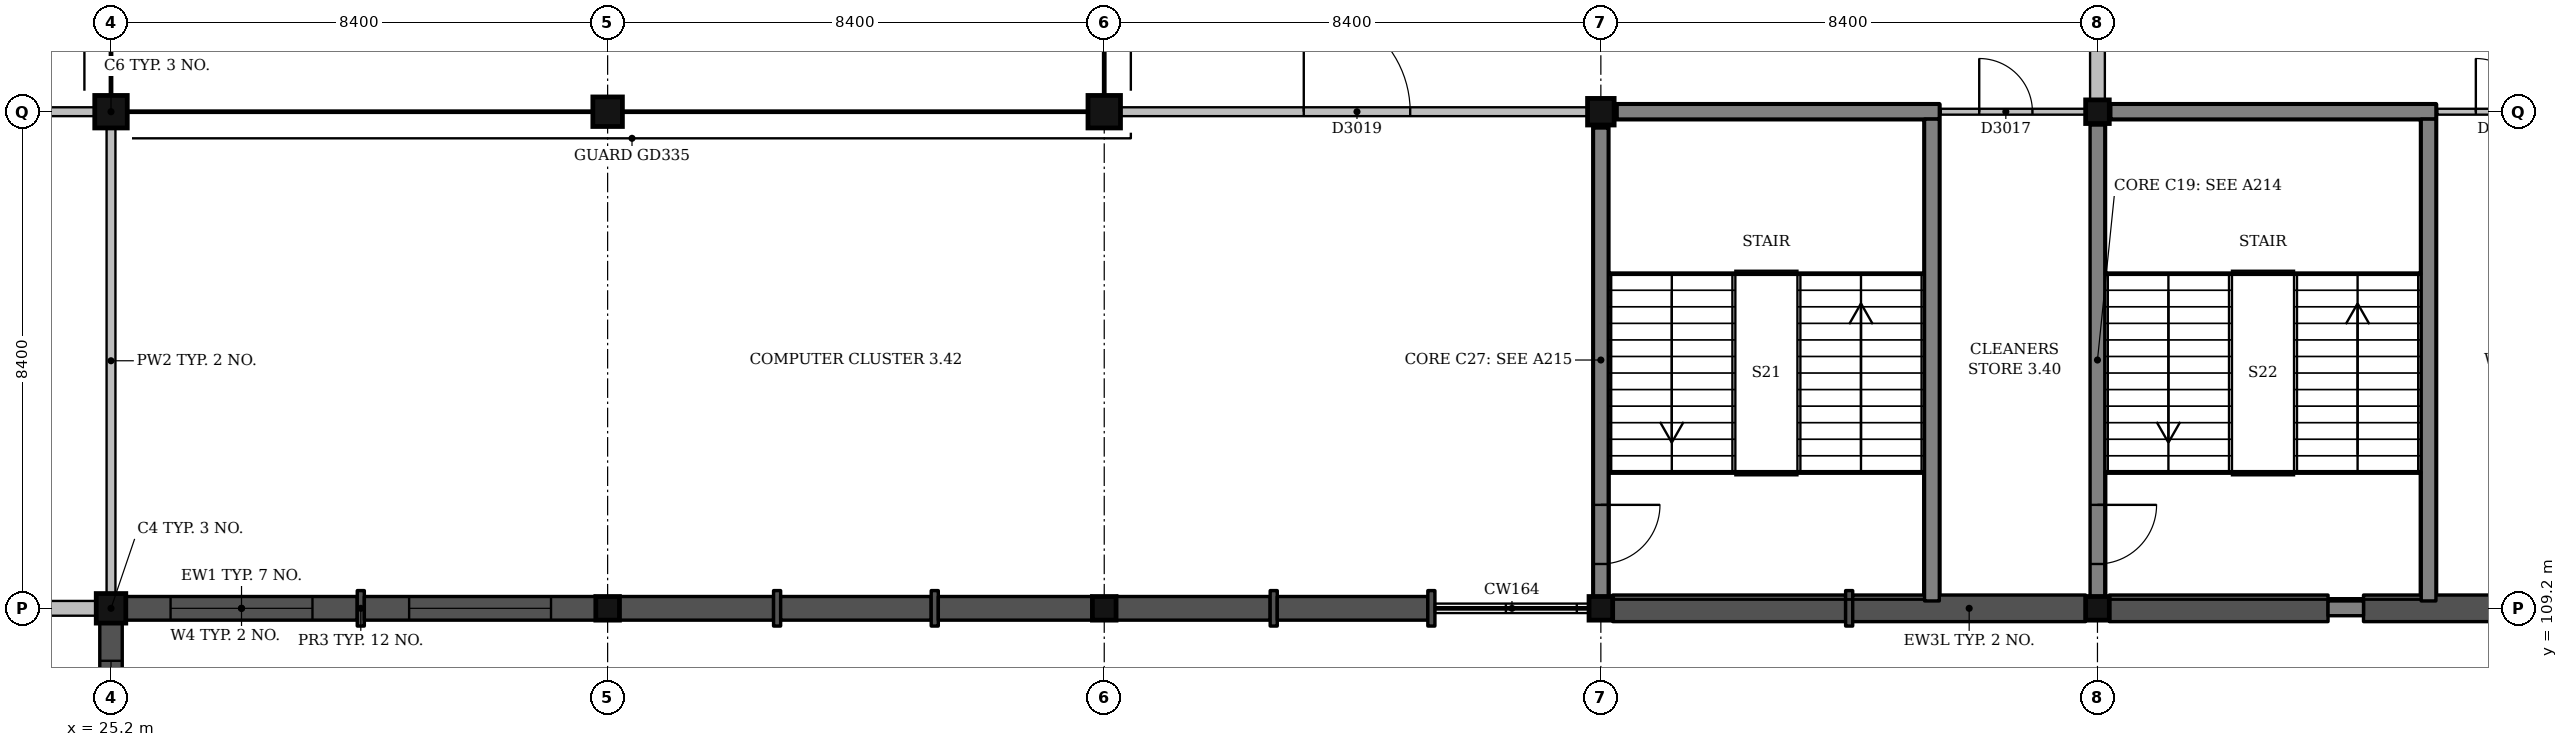
"""IFC4 building model, lengths in metres.
Left out: names, types, materials, properties, quantities, classifications, styles, units other than length and angle.
Written with IfcOpenShell. Run it as: python <this file> out.ifc"""

import sys

from ifc_helpers import new_model, si_unit, direction, frame, frame_2d, origin, origin_2d, place, context, subcontext, project, spatial, rectangle, extrude, element, fill, save


model = new_model("IFC4")
c1 = context("Model", 3, precision=1e-05, world=origin(), true_north=direction((0.0, 1.0)))
c2 = subcontext(c1, "Body", "Model", "MODEL_VIEW")
j1 = project(units=[si_unit("LENGTHUNIT", "METRE"), si_unit("PLANEANGLEUNIT", "RADIAN")], contexts=[c1])
p1 = place(None, origin())
s1 = spatial("IfcSite", under=j1, at=p1, CompositionType="ELEMENT")
p2 = place(p1, origin())
s2 = spatial("IfcBuilding", under=s1, at=p2, CompositionType="ELEMENT")
p3 = place(p2, frame((0.0, 0.0, 13.5)))
s3 = spatial("IfcBuildingStorey", under=s2, at=p3, CompositionType="ELEMENT", Elevation=13.5)
p4 = place(p3, frame((25.2, 109.2, 0.0), z_axis=(0.0, 0.0, 1.0), x_axis=(1.0, 0.0, 0.0)))
e1 = element("IfcColumn", 1, at=p4, inside=s3, PredefinedType="COLUMN", context=c2, shape_type="SweptSolid", body=[
    extrude(rectangle(XDim=0.5, YDim=0.5, at=origin_2d()), origin(), (0.0, 0.0, 1.0), 4.5),
])
p5 = place(p3, frame((25.2, 117.6, 0.0), z_axis=(0.0, 0.0, 1.0), x_axis=(1.0, 0.0, 0.0)))
e2 = element("IfcColumn", 2, at=p5, inside=s3, PredefinedType="COLUMN", context=c2, shape_type="SweptSolid", body=[
    extrude(rectangle(XDim=0.55, YDim=0.55, at=origin_2d()), origin(), (0.0, 0.0, 1.0), 4.5),
])
p6 = place(p3, frame((33.6, 109.2, 0.0), z_axis=(0.0, 0.0, 1.0), x_axis=(1.0, 0.0, 0.0)))
e3 = element("IfcColumn", 3, at=p6, inside=s3, PredefinedType="COLUMN", context=c2, shape_type="SweptSolid", body=[
    extrude(rectangle(XDim=0.4, YDim=0.4, at=origin_2d()), origin(), (0.0, 0.0, 1.0), 4.5),
])
p7 = place(p3, frame((33.6, 117.6, 0.0), z_axis=(0.0, 0.0, 1.0), x_axis=(1.0, 0.0, 0.0)))
e4 = element("IfcColumn", 4, at=p7, inside=s3, PredefinedType="COLUMN", context=c2, shape_type="SweptSolid", body=[
    extrude(rectangle(XDim=0.5, YDim=0.5, at=origin_2d()), origin(), (0.0, 0.0, 1.0), 4.5),
])
p8 = place(p3, frame((42.0, 109.2, 0.0), z_axis=(0.0, 0.0, 1.0), x_axis=(1.0, 0.0, 0.0)))
e5 = element("IfcColumn", 5, at=p8, inside=s3, PredefinedType="COLUMN", context=c2, shape_type="SweptSolid", body=[
    extrude(rectangle(XDim=0.4, YDim=0.4, at=origin_2d()), origin(), (0.0, 0.0, 1.0), 4.5),
])
p9 = place(p3, frame((42.0, 117.6, 0.0), z_axis=(0.0, 0.0, 1.0), x_axis=(1.0, 0.0, 0.0)))
e6 = element("IfcColumn", 6, at=p9, inside=s3, PredefinedType="COLUMN", context=c2, shape_type="SweptSolid", body=[
    extrude(rectangle(XDim=0.55, YDim=0.55, at=origin_2d()), origin(), (0.0, 0.0, 1.0), 4.5),
])
p10 = place(p3, frame((50.4, 109.2, 0.0), z_axis=(0.0, 0.0, 1.0), x_axis=(1.0, 0.0, 0.0)))
e7 = element("IfcColumn", 7, at=p10, inside=s3, PredefinedType="COLUMN", context=c2, shape_type="SweptSolid", body=[
    extrude(rectangle(XDim=0.4, YDim=0.4, at=origin_2d()), origin(), (0.0, 0.0, 1.0), 4.5),
])
p11 = place(p3, frame((50.4, 117.6, 0.0), z_axis=(0.0, 0.0, 1.0), x_axis=(1.0, 0.0, 0.0)))
e8 = element("IfcColumn", 8, at=p11, inside=s3, PredefinedType="COLUMN", context=c2, shape_type="SweptSolid", body=[
    extrude(rectangle(XDim=0.45, YDim=0.45, at=origin_2d()), origin(), (0.0, 0.0, 1.0), 4.5),
])
for number, where, z_axis, x_axis in (
    (9, (58.8, 109.2, 0.0), (0.0, 0.0, 1.0), (1.0, 0.0, 0.0)),
    (10, (58.8, 117.6, 0.0), (0.0, 0.0, 1.0), (1.0, 0.0, 0.0)),
):
    element("IfcColumn", number, at=place(p3, frame(where, z_axis=z_axis, x_axis=x_axis)), inside=s3, PredefinedType="COLUMN", context=c2, shape_type="SweptSolid", body=[
        extrude(rectangle(XDim=0.4, YDim=0.4, at=origin_2d()), origin(), (0.0, 0.0, 1.0), 4.5),
    ])
p12 = place(p3, frame((59.025, 117.6, 0.0), z_axis=(0.0, 0.0, 1.0), x_axis=(1.0, 0.0, 0.0)))
e11 = element("IfcWall", 11, at=p12, inside=s3, PredefinedType="SHEAR", context=c2, shape_type="SweptSolid", body=[
    extrude(rectangle(XDim=5.5, YDim=0.25, at=frame_2d((2.75, 0.0))), origin(), (0.0, 0.0, 1.0), 4.5),
])
p13 = place(p3, frame((58.8, 109.4, 0.0), z_axis=(0.0, 0.0, 1.0), x_axis=(0.0, 1.0, 0.0)))
e12 = element("IfcWall", 12, at=p13, inside=s3, PredefinedType="SHEAR", context=c2, shape_type="SweptSolid", body=[
    extrude(rectangle(XDim=7.975, YDim=0.25, at=frame_2d((3.988, 0.0))), origin(), (0.0, 0.0, 1.0), 4.5),
])
p14 = place(p13, frame((0.55, 0.0, 0.0)))
e13 = element("IfcOpeningElement", 13, at=p14, cuts=e12, PredefinedType="OPENING", context=c2, shape_type="SweptSolid", body=[
    extrude(rectangle(XDim=1.0, YDim=2.1, at=frame_2d((0.5, 1.05))), frame((0.0, 0.135, 0.0), z_axis=(0.0, -1.0, 0.0), x_axis=(1.0, 0.0, 0.0)), (0.0, 0.0, 1.0), 0.27),
])
p15 = place(p3, frame((64.4, 109.325, 0.0), z_axis=(0.0, 0.0, 1.0), x_axis=(0.0, 1.0, 0.0)))
e14 = element("IfcWall", 14, at=p15, inside=s3, PredefinedType="SHEAR", context=c2, shape_type="SweptSolid", body=[
    extrude(rectangle(XDim=8.15, YDim=0.25, at=frame_2d((4.075, 0.0))), origin(), (0.0, 0.0, 1.0), 4.5),
])
p16 = place(p3, frame((50.675, 117.6, 0.0), z_axis=(0.0, 0.0, 1.0), x_axis=(1.0, 0.0, 0.0)))
e15 = element("IfcWall", 15, at=p16, inside=s3, PredefinedType="SHEAR", context=c2, shape_type="SweptSolid", body=[
    extrude(rectangle(XDim=5.45, YDim=0.25, at=frame_2d((2.725, 0.0))), origin(), (0.0, 0.0, 1.0), 4.5),
])
p17 = place(p3, frame((50.4, 109.4, 0.0), z_axis=(0.0, 0.0, 1.0), x_axis=(0.0, 1.0, 0.0)))
e16 = element("IfcWall", 16, at=p17, inside=s3, PredefinedType="SHEAR", context=c2, shape_type="SweptSolid", body=[
    extrude(rectangle(XDim=7.925, YDim=0.25, at=frame_2d((3.962, 0.0))), origin(), (0.0, 0.0, 1.0), 4.5),
])
p18 = place(p17, frame((0.55, 0.0, 0.0)))
e17 = element("IfcOpeningElement", 17, at=p18, cuts=e16, PredefinedType="OPENING", context=c2, shape_type="SweptSolid", body=[
    extrude(rectangle(XDim=1.0, YDim=2.1, at=frame_2d((0.5, 1.05))), frame((0.0, 0.135, 0.0), z_axis=(0.0, -1.0, 0.0), x_axis=(1.0, 0.0, 0.0)), (0.0, 0.0, 1.0), 0.27),
])
p19 = place(p3, frame((56.0, 109.325, 0.0), z_axis=(0.0, 0.0, 1.0), x_axis=(0.0, 1.0, 0.0)))
e18 = element("IfcWall", 18, at=p19, inside=s3, PredefinedType="SHEAR", context=c2, shape_type="SweptSolid", body=[
    extrude(rectangle(XDim=8.15, YDim=0.25, at=frame_2d((4.075, 0.0))), origin(), (0.0, 0.0, 1.0), 4.5),
])
p20 = place(p3, frame((25.2, 105.275, 0.0), z_axis=(0.0, 0.0, 1.0), x_axis=(0.0, 1.0, 0.0)))
e19 = element("IfcWall", 19, at=p20, inside=s3, PredefinedType="SOLIDWALL", context=c2, shape_type="SweptSolid", body=[
    extrude(rectangle(XDim=3.675, YDim=0.38, at=frame_2d((1.837, 0.0))), origin(), (0.0, 0.0, 1.0), 3.35),
])
p21 = place(p20, frame((0.637, 0.0, 1.2)))
e20 = element("IfcOpeningElement", 20, at=p21, cuts=e19, PredefinedType="OPENING", context=c2, shape_type="SweptSolid", body=[
    extrude(rectangle(XDim=2.4, YDim=1.5, at=frame_2d((1.2, 0.75))), frame((0.0, 0.2, 0.0), z_axis=(0.0, -1.0, 0.0), x_axis=(1.0, 0.0, 0.0)), (0.0, 0.0, 1.0), 0.4),
])
p22 = place(p3, frame((25.45, 109.2, 0.0), z_axis=(0.0, 0.0, 1.0), x_axis=(1.0, 0.0, 0.0)))
e21 = element("IfcWall", 21, at=p22, inside=s3, PredefinedType="SOLIDWALL", context=c2, shape_type="SweptSolid", body=[
    extrude(rectangle(XDim=3.915, YDim=0.4, at=frame_2d((1.958, 0.0))), origin(), (0.0, 0.0, 1.0), 4.2),
])
p23 = place(p22, frame((0.758, 0.0, 0.6)))
e22 = element("IfcOpeningElement", 22, at=p23, cuts=e21, PredefinedType="OPENING", context=c2, shape_type="SweptSolid", body=[
    extrude(rectangle(XDim=2.4, YDim=2.4, at=frame_2d((1.2, 1.2))), frame((0.0, 0.21, 0.0), z_axis=(0.0, -1.0, 0.0), x_axis=(1.0, 0.0, 0.0)), (0.0, 0.0, 1.0), 0.42),
])
p24 = place(p3, frame((29.365, 109.2, 0.0), z_axis=(0.0, 0.0, 1.0), x_axis=(1.0, 0.0, 0.0)))
e23 = element("IfcWall", 23, at=p24, inside=s3, PredefinedType="SOLIDWALL", context=c2, shape_type="SweptSolid", body=[
    extrude(rectangle(XDim=0.12, YDim=0.6, at=frame_2d((0.06, 0.0))), origin(), (0.0, 0.0, 1.0), 4.2),
])
p25 = place(p3, frame((29.485, 109.2, 0.0), z_axis=(0.0, 0.0, 1.0), x_axis=(1.0, 0.0, 0.0)))
e24 = element("IfcWall", 24, at=p25, inside=s3, PredefinedType="SOLIDWALL", context=c2, shape_type="SweptSolid", body=[
    extrude(rectangle(XDim=3.915, YDim=0.4, at=frame_2d((1.958, 0.0))), origin(), (0.0, 0.0, 1.0), 4.2),
])
p26 = place(p25, frame((0.758, 0.0, 0.6)))
e25 = element("IfcOpeningElement", 25, at=p26, cuts=e24, PredefinedType="OPENING", context=c2, shape_type="SweptSolid", body=[
    extrude(rectangle(XDim=2.4, YDim=2.4, at=frame_2d((1.2, 1.2))), frame((0.0, 0.21, 0.0), z_axis=(0.0, -1.0, 0.0), x_axis=(1.0, 0.0, 0.0)), (0.0, 0.0, 1.0), 0.42),
])
p27 = place(p3, frame((33.8, 109.2, 0.0), z_axis=(0.0, 0.0, 1.0), x_axis=(1.0, 0.0, 0.0)))
e26 = element("IfcWall", 26, at=p27, inside=s3, PredefinedType="SOLIDWALL", context=c2, shape_type="SweptSolid", body=[
    extrude(rectangle(XDim=2.607, YDim=0.4, at=frame_2d((1.303, 0.0))), origin(), (0.0, 0.0, 1.0), 3.35),
])
p28 = place(p3, frame((36.407, 109.2, 0.0), z_axis=(0.0, 0.0, 1.0), x_axis=(1.0, 0.0, 0.0)))
e27 = element("IfcWall", 27, at=p28, inside=s3, PredefinedType="SOLIDWALL", context=c2, shape_type="SweptSolid", body=[
    extrude(rectangle(XDim=0.12, YDim=0.6, at=frame_2d((0.06, 0.0))), origin(), (0.0, 0.0, 1.0), 3.35),
])
p29 = place(p3, frame((36.527, 109.2, 0.0), z_axis=(0.0, 0.0, 1.0), x_axis=(1.0, 0.0, 0.0)))
e28 = element("IfcWall", 28, at=p29, inside=s3, PredefinedType="SOLIDWALL", context=c2, shape_type="SweptSolid", body=[
    extrude(rectangle(XDim=2.547, YDim=0.4, at=frame_2d((1.273, 0.0))), origin(), (0.0, 0.0, 1.0), 3.35),
])
p30 = place(p3, frame((39.073, 109.2, 0.0), z_axis=(0.0, 0.0, 1.0), x_axis=(1.0, 0.0, 0.0)))
e29 = element("IfcWall", 29, at=p30, inside=s3, PredefinedType="SOLIDWALL", context=c2, shape_type="SweptSolid", body=[
    extrude(rectangle(XDim=0.12, YDim=0.6, at=frame_2d((0.06, 0.0))), origin(), (0.0, 0.0, 1.0), 3.35),
])
for number, where, z_axis, x_axis in (
    (30, (39.193, 109.2, 0.0), (0.0, 0.0, 1.0), (1.0, 0.0, 0.0)),
    (31, (42.2, 109.2, 0.0), (0.0, 0.0, 1.0), (1.0, 0.0, 0.0)),
):
    element("IfcWall", number, at=place(p3, frame(where, z_axis=z_axis, x_axis=x_axis)), inside=s3, PredefinedType="SOLIDWALL", context=c2, shape_type="SweptSolid", body=[
        extrude(rectangle(XDim=2.607, YDim=0.4, at=frame_2d((1.303, 0.0))), origin(), (0.0, 0.0, 1.0), 3.35),
    ])
p31 = place(p3, frame((44.807, 109.2, 0.0), z_axis=(0.0, 0.0, 1.0), x_axis=(1.0, 0.0, 0.0)))
e32 = element("IfcWall", 32, at=p31, inside=s3, PredefinedType="SOLIDWALL", context=c2, shape_type="SweptSolid", body=[
    extrude(rectangle(XDim=0.12, YDim=0.6, at=frame_2d((0.06, 0.0))), origin(), (0.0, 0.0, 1.0), 3.35),
])
p32 = place(p3, frame((44.927, 109.2, 0.0), z_axis=(0.0, 0.0, 1.0), x_axis=(1.0, 0.0, 0.0)))
e33 = element("IfcWall", 33, at=p32, inside=s3, PredefinedType="SOLIDWALL", context=c2, shape_type="SweptSolid", body=[
    extrude(rectangle(XDim=2.547, YDim=0.4, at=frame_2d((1.273, 0.0))), origin(), (0.0, 0.0, 1.0), 3.35),
])
p33 = place(p3, frame((47.473, 109.2, 0.0), z_axis=(0.0, 0.0, 1.0), x_axis=(1.0, 0.0, 0.0)))
e34 = element("IfcWall", 34, at=p33, inside=s3, PredefinedType="SOLIDWALL", context=c2, shape_type="SweptSolid", body=[
    extrude(rectangle(XDim=0.12, YDim=0.6, at=frame_2d((0.06, 0.0))), origin(), (0.0, 0.0, 1.0), 3.35),
])
p34 = place(p3, frame((50.6, 109.2, 0.0), z_axis=(0.0, 0.0, 1.0), x_axis=(1.0, 0.0, 0.0)))
e35 = element("IfcWall", 35, at=p34, inside=s3, PredefinedType="SOLIDWALL", context=c2, shape_type="SweptSolid", body=[
    extrude(rectangle(XDim=3.94, YDim=0.45, at=frame_2d((1.97, 0.0))), origin(), (0.0, 0.0, 1.0), 3.35),
])
p35 = place(p3, frame((54.54, 109.2, 0.0), z_axis=(0.0, 0.0, 1.0), x_axis=(1.0, 0.0, 0.0)))
e36 = element("IfcWall", 36, at=p35, inside=s3, PredefinedType="SOLIDWALL", context=c2, shape_type="SweptSolid", body=[
    extrude(rectangle(XDim=0.12, YDim=0.6, at=frame_2d((0.06, 0.0))), origin(), (0.0, 0.0, 1.0), 3.35),
])
p36 = place(p3, frame((54.66, 109.2, 0.0), z_axis=(0.0, 0.0, 1.0), x_axis=(1.0, 0.0, 0.0)))
e37 = element("IfcWall", 37, at=p36, inside=s3, PredefinedType="SOLIDWALL", context=c2, shape_type="SweptSolid", body=[
    extrude(rectangle(XDim=3.94, YDim=0.45, at=frame_2d((1.97, 0.0))), origin(), (0.0, 0.0, 1.0), 3.35),
])
for number, where, z_axis, x_axis in (
    (38, (59.0, 109.2, 0.0), (0.0, 0.0, 1.0), (1.0, 0.0, 0.0)),
    (39, (63.3, 109.2, 0.0), (0.0, 0.0, 1.0), (1.0, 0.0, 0.0)),
):
    element("IfcWall", number, at=place(p3, frame(where, z_axis=z_axis, x_axis=x_axis)), inside=s3, PredefinedType="SOLIDWALL", context=c2, shape_type="SweptSolid", body=[
        extrude(rectangle(XDim=3.7, YDim=0.45, at=frame_2d((1.85, 0.0))), origin(), (0.0, 0.0, 1.0), 3.45),
    ])
p37 = place(p3, frame((17.1, 109.2, 0.0), z_axis=(0.0, 0.0, 1.0), x_axis=(1.0, 0.0, 0.0)))
e40 = element("IfcWall", 40, at=p37, inside=s3, PredefinedType="SOLIDWALL", context=c2, shape_type="SweptSolid", body=[
    extrude(rectangle(XDim=7.85, YDim=0.25, at=frame_2d((3.925, 0.0))), origin(), (0.0, 0.0, 1.0), 3.35),
])
p38 = place(p3, frame((17.1, 117.6, 0.0), z_axis=(0.0, 0.0, 1.0), x_axis=(1.0, 0.0, 0.0)))
e41 = element("IfcWall", 41, at=p38, inside=s3, PredefinedType="PARTITIONING", context=c2, shape_type="SweptSolid", body=[
    extrude(rectangle(XDim=7.825, YDim=0.15, at=frame_2d((3.913, 0.0))), origin(), (0.0, 0.0, 1.0), 3.4),
])
p39 = place(p3, frame((42.275, 117.6, 0.0), z_axis=(0.0, 0.0, 1.0), x_axis=(1.0, 0.0, 0.0)))
e42 = element("IfcWall", 42, at=p39, inside=s3, PredefinedType="PARTITIONING", context=c2, shape_type="SweptSolid", body=[
    extrude(rectangle(XDim=7.9, YDim=0.15, at=frame_2d((3.95, 0.0))), origin(), (0.0, 0.0, 1.0), 3.4),
])
p40 = place(p39, frame((3.1, 0.0, 0.0)))
e43 = element("IfcOpeningElement", 43, at=p40, cuts=e42, PredefinedType="OPENING", context=c2, shape_type="SweptSolid", body=[
    extrude(rectangle(XDim=1.8, YDim=2.1, at=frame_2d((0.9, 1.05))), frame((0.0, 0.085, 0.0), z_axis=(0.0, -1.0, 0.0), x_axis=(1.0, 0.0, 0.0)), (0.0, 0.0, 1.0), 0.17),
])
p41 = place(p3, frame((56.15, 117.6, 0.0), z_axis=(0.0, 0.0, 1.0), x_axis=(1.0, 0.0, 0.0)))
e44 = element("IfcWall", 44, at=p41, inside=s3, PredefinedType="PARTITIONING", context=c2, shape_type="SweptSolid", body=[
    extrude(rectangle(XDim=2.45, YDim=0.1, at=frame_2d((1.225, 0.0))), origin(), (0.0, 0.0, 1.0), 3.35),
])
p42 = place(p41, frame((0.65, 0.0, 0.0)))
e45 = element("IfcOpeningElement", 45, at=p42, cuts=e44, PredefinedType="OPENING", context=c2, shape_type="SweptSolid", body=[
    extrude(rectangle(XDim=0.9, YDim=2.1, at=frame_2d((0.45, 1.05))), frame((0.0, 0.06, 0.0), z_axis=(0.0, -1.0, 0.0), x_axis=(1.0, 0.0, 0.0)), (0.0, 0.0, 1.0), 0.12),
])
p43 = place(p3, frame((64.55, 117.6, 0.0), z_axis=(0.0, 0.0, 1.0), x_axis=(1.0, 0.0, 0.0)))
e46 = element("IfcWall", 46, at=p43, inside=s3, PredefinedType="PARTITIONING", context=c2, shape_type="SweptSolid", body=[
    extrude(rectangle(XDim=2.45, YDim=0.1, at=frame_2d((1.225, 0.0))), origin(), (0.0, 0.0, 1.0), 3.6),
])
p44 = place(p43, frame((0.65, 0.0, 0.0)))
e47 = element("IfcOpeningElement", 47, at=p44, cuts=e46, PredefinedType="OPENING", context=c2, shape_type="SweptSolid", body=[
    extrude(rectangle(XDim=0.9, YDim=2.1, at=frame_2d((0.45, 1.05))), frame((0.0, 0.06, 0.0), z_axis=(0.0, -1.0, 0.0), x_axis=(1.0, 0.0, 0.0)), (0.0, 0.0, 1.0), 0.12),
])
p45 = place(p3, frame((25.2, 109.45, 0.0), z_axis=(0.0, 0.0, 1.0), x_axis=(0.0, 1.0, 0.0)))
e48 = element("IfcWall", 48, at=p45, inside=s3, PredefinedType="PARTITIONING", context=c2, shape_type="SweptSolid", body=[
    extrude(rectangle(XDim=7.875, YDim=0.15, at=frame_2d((3.938, 0.0))), origin(), (0.0, 0.0, 1.0), 4.15),
])
p46 = place(p3, frame((58.8, 117.8, 0.0), z_axis=(0.0, 0.0, 1.0), x_axis=(0.0, 1.0, 0.0)))
e49 = element("IfcWall", 49, at=p46, inside=s3, PredefinedType="SOLIDWALL", context=c2, shape_type="SweptSolid", body=[
    extrude(rectangle(XDim=8.0, YDim=0.25, at=frame_2d((4.0, 0.0))), origin(), (0.0, 0.0, 1.0), 3.35),
])
p47 = place(p46, frame((1.35, 0.0, 0.0)))
e50 = element("IfcOpeningElement", 50, at=p47, cuts=e49, PredefinedType="OPENING", context=c2, shape_type="SweptSolid", body=[
    extrude(rectangle(XDim=1.0, YDim=2.1, at=frame_2d((0.5, 1.05))), frame((0.0, 0.135, 0.0), z_axis=(0.0, -1.0, 0.0), x_axis=(1.0, 0.0, 0.0)), (0.0, 0.0, 1.0), 0.27),
])
p48 = place(p3, frame((62.7, 109.2, 0.0), z_axis=(0.0, 0.0, 1.0), x_axis=(1.0, 0.0, 0.0)))
e51 = element("IfcWall", 51, at=p48, inside=s3, PredefinedType="SHEAR", context=c2, shape_type="SweptSolid", body=[
    extrude(rectangle(XDim=0.6, YDim=0.25, at=frame_2d((0.3, 0.0))), origin(), (0.0, 0.0, 1.0), 4.5),
])
p49 = place(p21, origin())
e52 = element("IfcWindow", 52, at=p49, inside=s3, PartitioningType="SINGLE_PANEL", PredefinedType="WINDOW", context=c2, shape_type="SweptSolid", body=[
    extrude(rectangle(XDim=2.4, YDim=1.5, at=frame_2d((1.2, 0.75))), frame((0.0, 0.15, 0.0), z_axis=(0.0, -1.0, 0.0), x_axis=(1.0, 0.0, 0.0)), (0.0, 0.0, 1.0), 0.06),
])
fill(e20, e52)
p50 = place(p23, origin())
e53 = element("IfcWindow", 53, at=p50, inside=s3, PartitioningType="SINGLE_PANEL", PredefinedType="WINDOW", context=c2, shape_type="SweptSolid", body=[
    extrude(rectangle(XDim=2.4, YDim=2.4, at=frame_2d((1.2, 1.2))), frame((0.0, 0.16, 0.0), z_axis=(0.0, -1.0, 0.0), x_axis=(1.0, 0.0, 0.0)), (0.0, 0.0, 1.0), 0.06),
])
fill(e22, e53)
p51 = place(p26, origin())
e54 = element("IfcWindow", 54, at=p51, inside=s3, PartitioningType="SINGLE_PANEL", PredefinedType="WINDOW", context=c2, shape_type="SweptSolid", body=[
    extrude(rectangle(XDim=2.4, YDim=2.4, at=frame_2d((1.2, 1.2))), frame((0.0, 0.16, 0.0), z_axis=(0.0, -1.0, 0.0), x_axis=(1.0, 0.0, 0.0)), (0.0, 0.0, 1.0), 0.06),
])
fill(e25, e54)
p52 = place(p42, origin())
e55 = element("IfcDoor", 55, at=p52, inside=s3, OperationType="SINGLE_SWING_LEFT", PredefinedType="DOOR", context=c2, shape_type="SweptSolid", body=[
    extrude(rectangle(XDim=0.9, YDim=2.1, at=frame_2d((0.45, 1.05))), frame((0.0, 0.025, 0.0), z_axis=(0.0, -1.0, 0.0), x_axis=(1.0, 0.0, 0.0)), (0.0, 0.0, 1.0), 0.05),
])
fill(e45, e55)
p53 = place(p40, origin())
e56 = element("IfcDoor", 56, at=p53, inside=s3, OperationType="DOUBLE_DOOR_SINGLE_SWING", PredefinedType="DOOR", context=c2, shape_type="SweptSolid", body=[
    extrude(rectangle(XDim=1.8, YDim=2.1, at=frame_2d((0.9, 1.05))), frame((0.0, 0.025, 0.0), z_axis=(0.0, -1.0, 0.0), x_axis=(1.0, 0.0, 0.0)), (0.0, 0.0, 1.0), 0.05),
])
fill(e43, e56)
p54 = place(p44, origin())
e57 = element("IfcDoor", 57, at=p54, inside=s3, OperationType="SINGLE_SWING_LEFT", PredefinedType="DOOR", context=c2, shape_type="SweptSolid", body=[
    extrude(rectangle(XDim=0.9, YDim=2.1, at=frame_2d((0.45, 1.05))), frame((0.0, 0.025, 0.0), z_axis=(0.0, -1.0, 0.0), x_axis=(1.0, 0.0, 0.0)), (0.0, 0.0, 1.0), 0.05),
])
fill(e47, e57)
p55 = place(p18, origin())
e58 = element("IfcDoor", 58, at=p55, inside=s3, OperationType="SINGLE_SWING_RIGHT", PredefinedType="DOOR", context=c2, shape_type="SweptSolid", body=[
    extrude(rectangle(XDim=1.0, YDim=2.1, at=frame_2d((0.5, 1.05))), frame((0.0, 0.025, 0.0), z_axis=(0.0, -1.0, 0.0), x_axis=(1.0, 0.0, 0.0)), (0.0, 0.0, 1.0), 0.05),
])
fill(e17, e58)
p56 = place(p14, origin())
e59 = element("IfcDoor", 59, at=p56, inside=s3, OperationType="SINGLE_SWING_RIGHT", PredefinedType="DOOR", context=c2, shape_type="SweptSolid", body=[
    extrude(rectangle(XDim=1.0, YDim=2.1, at=frame_2d((0.5, 1.05))), frame((0.0, 0.025, 0.0), z_axis=(0.0, -1.0, 0.0), x_axis=(1.0, 0.0, 0.0)), (0.0, 0.0, 1.0), 0.05),
])
fill(e13, e59)
save(model, sys.argv[1])
